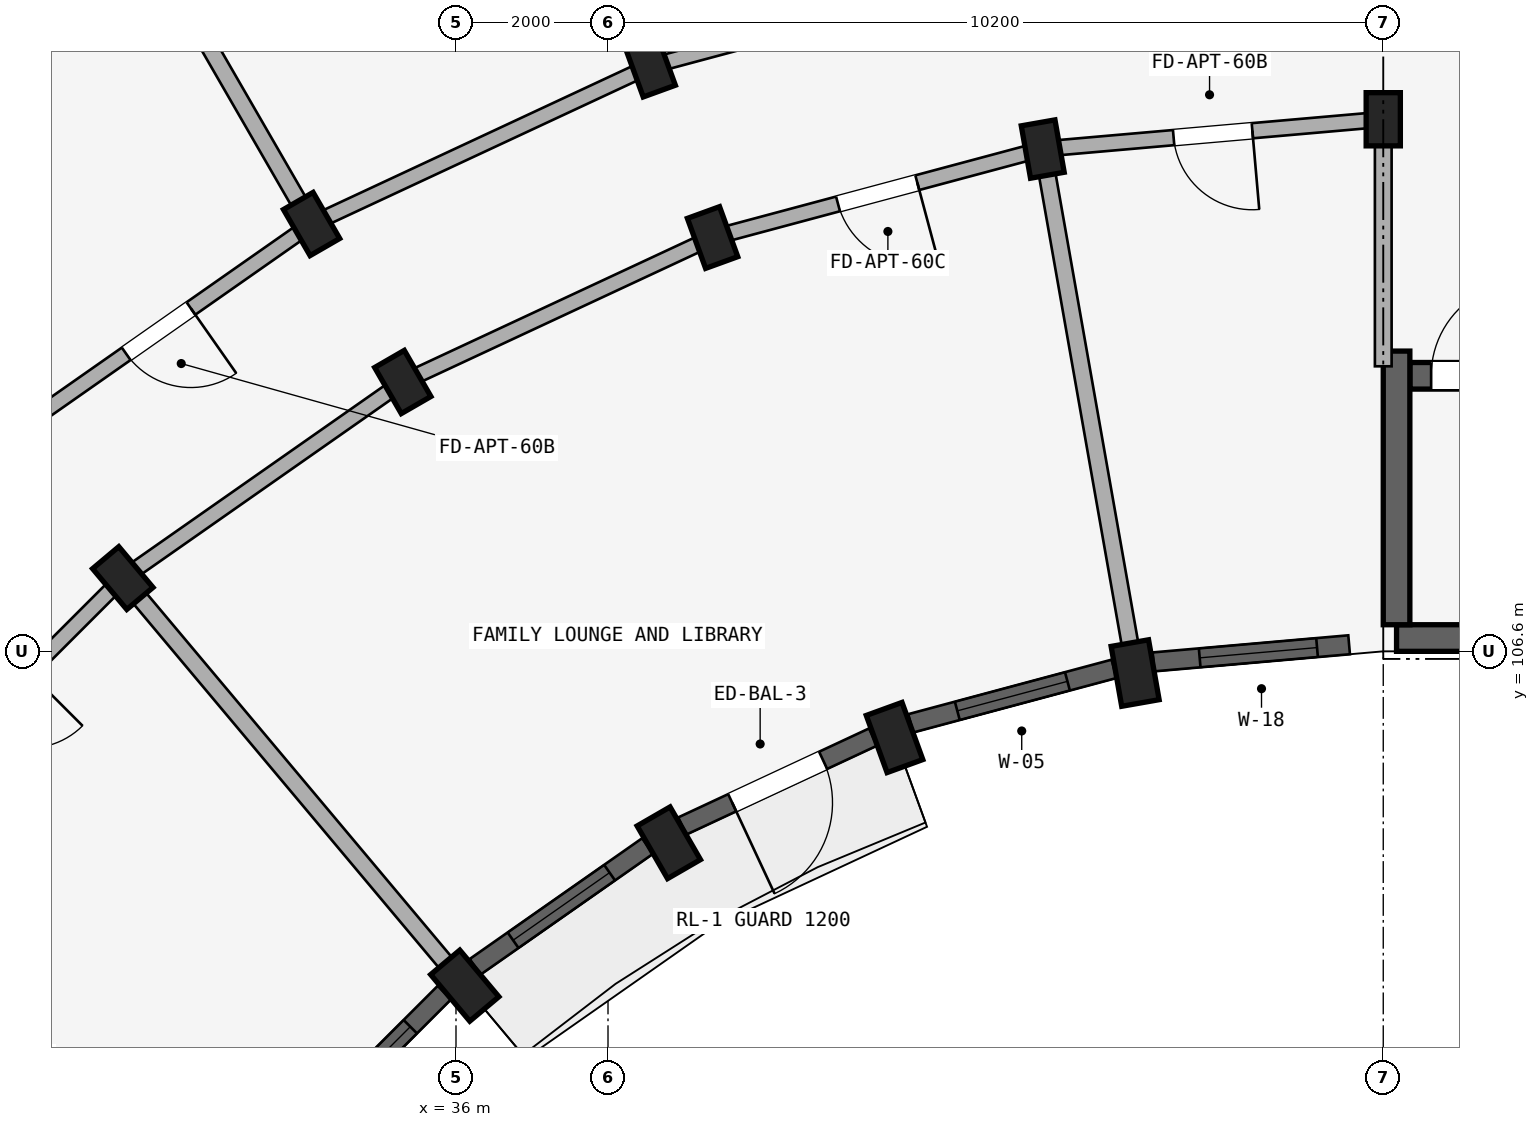
"""IFC4 building model, lengths in metres.
Left out: names, types, materials, properties, quantities, classifications, styles, units other than length and angle.
Written with IfcOpenShell. Run it as: python <this file> out.ifc"""

import sys

from ifc_helpers import new_model, si_unit, direction, frame, frame_2d, origin, origin_2d, place, context, subcontext, project, spatial, rectangle, extrude, element, fill, save


model = new_model("IFC4")
c1 = context("Model", 3, precision=1e-05, world=origin(), true_north=direction((0.0, 1.0)))
c2 = subcontext(c1, "Body", "Model", "MODEL_VIEW")
j1 = project(units=[si_unit("LENGTHUNIT", "METRE"), si_unit("PLANEANGLEUNIT", "RADIAN")], contexts=[c1])
p1 = place(None, origin())
s1 = spatial("IfcSite", under=j1, at=p1, CompositionType="ELEMENT")
p2 = place(p1, origin())
s2 = spatial("IfcBuilding", under=s1, at=p2, CompositionType="ELEMENT")
p3 = place(p2, frame((0.0, 0.0, 21.3)))
s3 = spatial("IfcBuildingStorey", under=s2, at=p3, CompositionType="ELEMENT", Elevation=21.3)
p4 = place(p3, frame((48.375, 106.775, 0.0), z_axis=(0.0, 0.0, 1.0), x_axis=(1.0, 0.0, 0.0)))
e1 = element("IfcWall", 1, at=p4, inside=s3, PredefinedType="SHEAR", context=c2, shape_type="SweptSolid", body=[
    extrude(rectangle(XDim=8.25, YDim=0.35, at=frame_2d((4.125, 0.0))), origin(), (0.0, 0.0, 1.0), 2.93),
])
p5 = place(p3, frame((48.55, 110.225, 0.0), z_axis=(0.0, 0.0, 1.0), x_axis=(1.0, 0.0, 0.0)))
e2 = element("IfcWall", 2, at=p5, inside=s3, PredefinedType="SHEAR", context=c2, shape_type="SweptSolid", body=[
    extrude(rectangle(XDim=7.9, YDim=0.35, at=frame_2d((3.95, 0.0))), origin(), (0.0, 0.0, 1.0), 2.93),
])
p6 = place(p5, frame((0.28, 0.0, 0.0)))
e3 = element("IfcOpeningElement", 3, at=p6, cuts=e2, PredefinedType="OPENING", context=c2, shape_type="SweptSolid", body=[
    extrude(rectangle(XDim=1.24, YDim=2.15, at=frame_2d((0.62, 1.075))), frame((0.0, 0.185, 0.0), z_axis=(0.0, -1.0, 0.0), x_axis=(1.0, 0.0, 0.0)), (0.0, 0.0, 1.0), 0.37),
])
p7 = place(p3, frame((48.375, 106.95, 0.0), z_axis=(0.0, 0.0, 1.0), x_axis=(0.0, 1.0, 0.0)))
e4 = element("IfcWall", 4, at=p7, inside=s3, PredefinedType="SHEAR", context=c2, shape_type="SweptSolid", body=[
    extrude(rectangle(XDim=3.6, YDim=0.35, at=frame_2d((1.8, 0.0))), origin(), (0.0, 0.0, 1.0), 2.93),
])
p8 = place(p3, frame((48.2, 113.6, 0.0), z_axis=(0.0, 0.0, 1.0), x_axis=(1.0, 0.0, 0.0)))
e5 = element("IfcColumn", 5, at=p8, inside=s3, PredefinedType="COLUMN", context=c2, shape_type="SweptSolid", body=[
    extrude(rectangle(XDim=0.45, YDim=0.7, at=origin_2d()), origin(), (0.0, 0.0, 1.0), 2.93),
])
p9 = place(p3, frame((44.935, 106.314, 0.0), z_axis=(0.0, 0.0, 1.0), x_axis=(0.984807753012, 0.173648177667, 0.0)))
e6 = element("IfcColumn", 6, at=p9, inside=s3, PredefinedType="COLUMN", context=c2, shape_type="SweptSolid", body=[
    extrude(rectangle(XDim=0.5, YDim=0.8, at=origin_2d()), origin(), (0.0, 0.0, 1.0), 2.93),
])
p10 = place(p3, frame((43.72, 113.208, 0.0), z_axis=(0.0, 0.0, 1.0), x_axis=(0.984807753012, 0.173648177667, 0.0)))
e7 = element("IfcColumn", 7, at=p10, inside=s3, PredefinedType="COLUMN", context=c2, shape_type="SweptSolid", body=[
    extrude(rectangle(XDim=0.45, YDim=0.7, at=origin_2d()), origin(), (0.0, 0.0, 1.0), 2.93),
])
p11 = place(p3, frame((41.77, 105.466, 0.0), z_axis=(0.0, 0.0, 1.0), x_axis=(0.939692620786, 0.342020143326, 0.0)))
e8 = element("IfcColumn", 8, at=p11, inside=s3, PredefinedType="COLUMN", context=c2, shape_type="SweptSolid", body=[
    extrude(rectangle(XDim=0.5, YDim=0.8, at=origin_2d()), origin(), (0.0, 0.0, 1.0), 2.93),
])
for number, where, z_axis, x_axis in (
    (9, (39.376, 112.044, 0.0), (0.0, 0.0, 1.0), (0.94, 0.342, 0.0)),
    (10, (38.555, 114.299, 0.0), (0.0, 0.0, 1.0), (0.94, 0.342, 0.0)),
):
    element("IfcColumn", number, at=place(p3, frame(where, z_axis=z_axis, x_axis=x_axis)), inside=s3, PredefinedType="COLUMN", context=c2, shape_type="SweptSolid", body=[
        extrude(rectangle(XDim=0.45, YDim=0.7, at=origin_2d()), origin(), (0.0, 0.0, 1.0), 2.93),
    ])
p12 = place(p3, frame((38.8, 104.081, 0.0), z_axis=(0.0, 0.0, 1.0), x_axis=(0.866025403784, 0.5, 0.0)))
e11 = element("IfcColumn", 11, at=p12, inside=s3, PredefinedType="COLUMN", context=c2, shape_type="SweptSolid", body=[
    extrude(rectangle(XDim=0.5, YDim=0.8, at=origin_2d()), origin(), (0.0, 0.0, 1.0), 2.93),
])
for number, where, z_axis, x_axis in (
    (12, (35.3, 110.144, 0.0), (0.0, 0.0, 1.0), (0.866, 0.5, 0.0)),
    (13, (34.1, 112.222, 0.0), (0.0, 0.0, 1.0), (0.866, 0.5, 0.0)),
):
    element("IfcColumn", number, at=place(p3, frame(where, z_axis=z_axis, x_axis=x_axis)), inside=s3, PredefinedType="COLUMN", context=c2, shape_type="SweptSolid", body=[
        extrude(rectangle(XDim=0.45, YDim=0.7, at=origin_2d()), origin(), (0.0, 0.0, 1.0), 2.93),
    ])
p13 = place(p3, frame((36.115, 102.202, 0.0), z_axis=(0.0, 0.0, 1.0), x_axis=(0.766044443119, 0.642787609687, 0.0)))
e14 = element("IfcColumn", 14, at=p13, inside=s3, PredefinedType="COLUMN", context=c2, shape_type="SweptSolid", body=[
    extrude(rectangle(XDim=0.5, YDim=0.8, at=origin_2d()), origin(), (0.0, 0.0, 1.0), 2.93),
])
p14 = place(p3, frame((31.616, 107.564, 0.0), z_axis=(0.0, 0.0, 1.0), x_axis=(0.766044443119, 0.642787609687, 0.0)))
e15 = element("IfcColumn", 15, at=p14, inside=s3, PredefinedType="COLUMN", context=c2, shape_type="SweptSolid", body=[
    extrude(rectangle(XDim=0.45, YDim=0.7, at=origin_2d()), origin(), (0.0, 0.0, 1.0), 2.93),
])
p15 = place(p3, frame((48.2, 113.6, 0.0), z_axis=(0.0, 0.0, 1.0), x_axis=(-0.996191949488, -0.087187153726, 0.0)))
e16 = element("IfcWall", 16, at=p15, inside=s3, PredefinedType="STANDARD", context=c2, shape_type="SweptSolid", body=[
    extrude(rectangle(XDim=4.497, YDim=0.2, at=frame_2d((2.249, 0.0))), origin(), (0.0, 0.0, 1.0), 2.372),
])
p16 = place(p15, frame((1.729, 0.0, 0.0)))
e17 = element("IfcOpeningElement", 17, at=p16, cuts=e16, PredefinedType="OPENING", context=c2, shape_type="SweptSolid", body=[
    extrude(rectangle(XDim=1.04, YDim=2.15, at=frame_2d((0.52, 1.075))), frame((0.0, 0.11, 0.0), z_axis=(0.0, -1.0, 0.0), x_axis=(1.0, 0.0, 0.0)), (0.0, 0.0, 1.0), 0.22),
])
p17 = place(p3, frame((43.72, 113.208, 0.0), z_axis=(0.0, 0.0, 1.0), x_axis=(-0.965934240054, -0.258787642463, 0.0)))
e18 = element("IfcWall", 18, at=p17, inside=s3, PredefinedType="STANDARD", context=c2, shape_type="SweptSolid", body=[
    extrude(rectangle(XDim=4.497, YDim=0.2, at=frame_2d((2.249, 0.0))), origin(), (0.0, 0.0, 1.0), 2.372),
])
p18 = place(p17, frame((1.709, 0.0, 0.0)))
e19 = element("IfcOpeningElement", 19, at=p18, cuts=e18, PredefinedType="OPENING", context=c2, shape_type="SweptSolid", body=[
    extrude(rectangle(XDim=1.08, YDim=2.15, at=frame_2d((0.54, 1.075))), frame((0.0, 0.11, 0.0), z_axis=(0.0, -1.0, 0.0), x_axis=(1.0, 0.0, 0.0)), (0.0, 0.0, 1.0), 0.22),
])
p19 = place(p3, frame((43.303, 115.572, 0.0), z_axis=(0.0, 0.0, 1.0), x_axis=(-0.965930095386, -0.258803112091, 0.0)))
e20 = element("IfcWall", 20, at=p19, inside=s3, PredefinedType="STANDARD", context=c2, shape_type="SweptSolid", body=[
    extrude(rectangle(XDim=4.916, YDim=0.2, at=frame_2d((2.458, 0.0))), origin(), (0.0, 0.0, 1.0), 2.372),
])
p20 = place(p3, frame((39.376, 112.044, 0.0), z_axis=(0.0, 0.0, 1.0), x_axis=(-0.906307919131, -0.422617978463, 0.0)))
e21 = element("IfcWall", 21, at=p20, inside=s3, PredefinedType="STANDARD", context=c2, shape_type="SweptSolid", body=[
    extrude(rectangle(XDim=4.497, YDim=0.2, at=frame_2d((2.249, 0.0))), origin(), (0.0, 0.0, 1.0), 2.372),
])
p21 = place(p3, frame((38.555, 114.299, 0.0), z_axis=(0.0, 0.0, 1.0), x_axis=(-0.906302381024, -0.422629854778, 0.0)))
e22 = element("IfcWall", 22, at=p21, inside=s3, PredefinedType="STANDARD", context=c2, shape_type="SweptSolid", body=[
    extrude(rectangle(XDim=4.915, YDim=0.2, at=frame_2d((2.458, 0.0))), origin(), (0.0, 0.0, 1.0), 2.372),
])
p22 = place(p3, frame((35.3, 110.144, 0.0), z_axis=(0.0, 0.0, 1.0), x_axis=(-0.819155404658, -0.573571637217, 0.0)))
e23 = element("IfcWall", 23, at=p22, inside=s3, PredefinedType="STANDARD", context=c2, shape_type="SweptSolid", body=[
    extrude(rectangle(XDim=4.497, YDim=0.2, at=frame_2d((2.249, 0.0))), origin(), (0.0, 0.0, 1.0), 2.372),
])
p23 = place(p3, frame((34.1, 112.222, 0.0), z_axis=(0.0, 0.0, 1.0), x_axis=(-0.819140911474, -0.573592335331, 0.0)))
e24 = element("IfcWall", 24, at=p23, inside=s3, PredefinedType="STANDARD", context=c2, shape_type="SweptSolid", body=[
    extrude(rectangle(XDim=4.916, YDim=0.2, at=frame_2d((2.458, 0.0))), origin(), (0.0, 0.0, 1.0), 2.372),
])
p24 = place(p23, frame((1.938, 0.0, 0.0)))
e25 = element("IfcOpeningElement", 25, at=p24, cuts=e24, PredefinedType="OPENING", context=c2, shape_type="SweptSolid", body=[
    extrude(rectangle(XDim=1.04, YDim=2.15, at=frame_2d((0.52, 1.075))), frame((0.0, 0.11, 0.0), z_axis=(0.0, -1.0, 0.0), x_axis=(1.0, 0.0, 0.0)), (0.0, 0.0, 1.0), 0.22),
])
p25 = place(p3, frame((31.616, 107.564, 0.0), z_axis=(0.0, 0.0, 1.0), x_axis=(-0.707106781187, -0.707106781187, 0.0)))
e26 = element("IfcWall", 26, at=p25, inside=s3, PredefinedType="STANDARD", context=c2, shape_type="SweptSolid", body=[
    extrude(rectangle(XDim=4.497, YDim=0.2, at=frame_2d((2.249, 0.0))), origin(), (0.0, 0.0, 1.0), 2.372),
])
p26 = place(p25, frame((1.749, 0.0, 0.0)))
e27 = element("IfcOpeningElement", 27, at=p26, cuts=e26, PredefinedType="OPENING", context=c2, shape_type="SweptSolid", body=[
    extrude(rectangle(XDim=1.0, YDim=2.15, at=frame_2d((0.5, 1.075))), frame((0.0, 0.11, 0.0), z_axis=(0.0, -1.0, 0.0), x_axis=(1.0, 0.0, 0.0)), (0.0, 0.0, 1.0), 0.22),
])
p27 = place(p3, frame((48.2, 110.35, 0.0), z_axis=(0.0, 0.0, 1.0), x_axis=(0.0, 1.0, 0.0)))
e28 = element("IfcWall", 28, at=p27, inside=s3, PredefinedType="STANDARD", context=c2, shape_type="SweptSolid", body=[
    extrude(rectangle(XDim=3.2, YDim=0.22, at=frame_2d((1.6, 0.0))), origin(), (0.0, 0.0, 1.0), 2.372),
])
p28 = place(p3, frame((44.901, 106.511, 0.0), z_axis=(0.0, 0.0, 1.0), x_axis=(-0.173647089161, 0.984807944945, 0.0)))
e29 = element("IfcWall", 29, at=p28, inside=s3, PredefinedType="STANDARD", context=c2, shape_type="SweptSolid", body=[
    extrude(rectangle(XDim=6.75, YDim=0.22, at=frame_2d((3.375, 0.0))), origin(), (0.0, 0.0, 1.0), 2.372),
])
p29 = place(p3, frame((38.521, 114.393, 0.0), z_axis=(0.0, 0.0, 1.0), x_axis=(-0.342022120477, 0.939691901159, 0.0)))
e30 = element("IfcWall", 30, at=p29, inside=s3, PredefinedType="PARTITIONING", context=c2, shape_type="SweptSolid", body=[
    extrude(rectangle(XDim=17.42, YDim=0.15, at=frame_2d((8.71, 0.0))), origin(), (0.0, 0.0, 1.0), 2.372),
])
p30 = place(p29, frame((4.45, 0.0, 0.0)))
e31 = element("IfcOpeningElement", 31, at=p30, cuts=e30, PredefinedType="OPENING", context=c2, shape_type="SweptSolid", body=[
    extrude(rectangle(XDim=0.8, YDim=2.1, at=frame_2d((0.4, 1.05))), frame((0.0, 0.085, 0.0), z_axis=(0.0, -1.0, 0.0), x_axis=(1.0, 0.0, 0.0)), (0.0, 0.0, 1.0), 0.17),
])
p31 = place(p3, frame((34.05, 112.309, 0.0), z_axis=(0.0, 0.0, 1.0), x_axis=(-0.499997843263, 0.866026648973, 0.0)))
e32 = element("IfcWall", 32, at=p31, inside=s3, PredefinedType="STANDARD", context=c2, shape_type="SweptSolid", body=[
    extrude(rectangle(XDim=17.42, YDim=0.22, at=frame_2d((8.71, 0.0))), origin(), (0.0, 0.0, 1.0), 2.372),
])
p32 = place(p3, frame((35.987, 102.355, 0.0), z_axis=(0.0, 0.0, 1.0), x_axis=(-0.642784846501, 0.766046761698, 0.0)))
e33 = element("IfcWall", 33, at=p32, inside=s3, PredefinedType="STANDARD", context=c2, shape_type="SweptSolid", body=[
    extrude(rectangle(XDim=6.75, YDim=0.22, at=frame_2d((3.375, 0.0))), origin(), (0.0, 0.0, 1.0), 2.372),
])
p33 = place(p3, frame((47.751, 106.686, 0.0), z_axis=(0.0, 0.0, 1.0), x_axis=(-0.996188278786, -0.087229084652, 0.0)))
e34 = element("IfcWall", 34, at=p33, inside=s3, PredefinedType="STANDARD", context=c2, shape_type="SweptSolid", body=[
    extrude(rectangle(XDim=2.583, YDim=0.25, at=frame_2d((1.292, 0.0))), origin(), (0.0, 0.0, 1.0), 2.472),
])
p34 = place(p33, frame((0.424, 0.0, 0.672)))
e35 = element("IfcOpeningElement", 35, at=p34, cuts=e34, PredefinedType="OPENING", context=c2, shape_type="SweptSolid", body=[
    extrude(rectangle(XDim=1.55, YDim=1.6, at=frame_2d((0.775, 0.8))), frame((0.0, 0.135, 0.0), z_axis=(0.0, -1.0, 0.0), x_axis=(1.0, 0.0, 0.0)), (0.0, 0.0, 1.0), 0.27),
])
p35 = place(p3, frame((44.658, 106.369, 0.0), z_axis=(0.0, 0.0, 1.0), x_axis=(-0.965935855992, -0.25878161084, 0.0)))
e36 = element("IfcWall", 36, at=p35, inside=s3, PredefinedType="STANDARD", context=c2, shape_type="SweptSolid", body=[
    extrude(rectangle(XDim=2.77, YDim=0.25, at=frame_2d((1.385, 0.0))), origin(), (0.0, 0.0, 1.0), 2.472),
])
p36 = place(p35, frame((0.635, 0.0, 0.622)))
e37 = element("IfcOpeningElement", 37, at=p36, cuts=e36, PredefinedType="OPENING", context=c2, shape_type="SweptSolid", body=[
    extrude(rectangle(XDim=1.5, YDim=1.65, at=frame_2d((0.75, 0.825))), frame((0.0, 0.135, 0.0), z_axis=(0.0, -1.0, 0.0), x_axis=(1.0, 0.0, 0.0)), (0.0, 0.0, 1.0), 0.27),
])
p37 = place(p3, frame((41.487, 105.472, 0.0), z_axis=(0.0, 0.0, 1.0), x_axis=(-0.906293449611, -0.422649007088, 0.0)))
e38 = element("IfcWall", 38, at=p37, inside=s3, PredefinedType="STANDARD", context=c2, shape_type="SweptSolid", body=[
    extrude(rectangle(XDim=2.77, YDim=0.25, at=frame_2d((1.385, 0.0))), origin(), (0.0, 0.0, 1.0), 2.472),
])
p38 = place(p37, frame((0.725, 0.0, 0.0)))
e39 = element("IfcOpeningElement", 39, at=p38, cuts=e38, PredefinedType="OPENING", context=c2, shape_type="SweptSolid", body=[
    extrude(rectangle(XDim=1.32, YDim=2.15, at=frame_2d((0.66, 1.075))), frame((0.0, 0.135, 0.0), z_axis=(0.0, -1.0, 0.0), x_axis=(1.0, 0.0, 0.0)), (0.0, 0.0, 1.0), 0.27),
])
p39 = place(p3, frame((38.521, 104.038, 0.0), z_axis=(0.0, 0.0, 1.0), x_axis=(-0.819111815273, -0.573633885053, 0.0)))
e40 = element("IfcWall", 40, at=p39, inside=s3, PredefinedType="STANDARD", context=c2, shape_type="SweptSolid", body=[
    extrude(rectangle(XDim=2.77, YDim=0.25, at=frame_2d((1.385, 0.0))), origin(), (0.0, 0.0, 1.0), 2.472),
])
p40 = place(p39, frame((0.61, 0.0, 0.672)))
e41 = element("IfcOpeningElement", 41, at=p40, cuts=e40, PredefinedType="OPENING", context=c2, shape_type="SweptSolid", body=[
    extrude(rectangle(XDim=1.55, YDim=1.6, at=frame_2d((0.775, 0.8))), frame((0.0, 0.135, 0.0), z_axis=(0.0, -1.0, 0.0), x_axis=(1.0, 0.0, 0.0)), (0.0, 0.0, 1.0), 0.27),
])
p41 = place(p3, frame((35.848, 102.111, 0.0), z_axis=(0.0, 0.0, 1.0), x_axis=(-0.707106781187, -0.707106781187, 0.0)))
e42 = element("IfcWall", 42, at=p41, inside=s3, PredefinedType="STANDARD", context=c2, shape_type="SweptSolid", body=[
    extrude(rectangle(XDim=2.77, YDim=0.25, at=frame_2d((1.385, 0.0))), origin(), (0.0, 0.0, 1.0), 2.472),
])
p42 = place(p41, frame((0.635, 0.0, 0.622)))
e43 = element("IfcOpeningElement", 43, at=p42, cuts=e42, PredefinedType="OPENING", context=c2, shape_type="SweptSolid", body=[
    extrude(rectangle(XDim=1.5, YDim=1.65, at=frame_2d((0.75, 0.825))), frame((0.0, 0.135, 0.0), z_axis=(0.0, -1.0, 0.0), x_axis=(1.0, 0.0, 0.0)), (0.0, 0.0, 1.0), 0.27),
])
p43 = place(p34, origin())
e44 = element("IfcWindow", 44, at=p43, inside=s3, PartitioningType="DOUBLE_PANEL_VERTICAL", PredefinedType="WINDOW", context=c2, shape_type="SweptSolid", body=[
    extrude(rectangle(XDim=1.55, YDim=1.6, at=frame_2d((0.775, 0.8))), frame((0.0, 0.03, 0.0), z_axis=(0.0, -1.0, 0.0), x_axis=(1.0, 0.0, 0.0)), (0.0, 0.0, 1.0), 0.06),
])
fill(e35, e44)
p44 = place(p36, origin())
e45 = element("IfcWindow", 45, at=p44, inside=s3, PartitioningType="DOUBLE_PANEL_VERTICAL", PredefinedType="WINDOW", context=c2, shape_type="SweptSolid", body=[
    extrude(rectangle(XDim=1.5, YDim=1.65, at=frame_2d((0.75, 0.825))), frame((0.0, 0.03, 0.0), z_axis=(0.0, -1.0, 0.0), x_axis=(1.0, 0.0, 0.0)), (0.0, 0.0, 1.0), 0.06),
])
fill(e37, e45)
p45 = place(p40, origin())
e46 = element("IfcWindow", 46, at=p45, inside=s3, PartitioningType="DOUBLE_PANEL_VERTICAL", PredefinedType="WINDOW", context=c2, shape_type="SweptSolid", body=[
    extrude(rectangle(XDim=1.55, YDim=1.6, at=frame_2d((0.775, 0.8))), frame((0.0, 0.03, 0.0), z_axis=(0.0, -1.0, 0.0), x_axis=(1.0, 0.0, 0.0)), (0.0, 0.0, 1.0), 0.06),
])
fill(e41, e46)
p46 = place(p42, origin())
e47 = element("IfcWindow", 47, at=p46, inside=s3, PartitioningType="DOUBLE_PANEL_VERTICAL", PredefinedType="WINDOW", context=c2, shape_type="SweptSolid", body=[
    extrude(rectangle(XDim=1.5, YDim=1.65, at=frame_2d((0.75, 0.825))), frame((0.0, 0.03, 0.0), z_axis=(0.0, -1.0, 0.0), x_axis=(1.0, 0.0, 0.0)), (0.0, 0.0, 1.0), 0.06),
])
fill(e43, e47)
p47 = place(p6, frame((1.24, 0.0, 0.0), z_axis=(0.0, 0.0, 1.0), x_axis=(-1.0, 0.0, 0.0)))
e48 = element("IfcDoor", 48, at=p47, inside=s3, OperationType="SINGLE_SWING_LEFT", PredefinedType="DOOR", context=c2, shape_type="SweptSolid", body=[
    extrude(rectangle(XDim=1.24, YDim=2.15, at=frame_2d((0.62, 1.075))), frame((0.0, 0.025, 0.0), z_axis=(0.0, -1.0, 0.0), x_axis=(1.0, 0.0, 0.0)), (0.0, 0.0, 1.0), 0.05),
])
fill(e3, e48)
p48 = place(p24, frame((1.04, 0.0, 0.0), z_axis=(0.0, 0.0, 1.0), x_axis=(-1.0, 0.0, 0.0)))
e49 = element("IfcDoor", 49, at=p48, inside=s3, OperationType="SINGLE_SWING_RIGHT", PredefinedType="DOOR", context=c2, shape_type="SweptSolid", body=[
    extrude(rectangle(XDim=1.04, YDim=2.15, at=frame_2d((0.52, 1.075))), frame((0.0, 0.025, 0.0), z_axis=(0.0, -1.0, 0.0), x_axis=(1.0, 0.0, 0.0)), (0.0, 0.0, 1.0), 0.05),
])
fill(e25, e49)
p49 = place(p16, origin())
e50 = element("IfcDoor", 50, at=p49, inside=s3, OperationType="SINGLE_SWING_LEFT", PredefinedType="DOOR", context=c2, shape_type="SweptSolid", body=[
    extrude(rectangle(XDim=1.04, YDim=2.15, at=frame_2d((0.52, 1.075))), frame((0.0, 0.025, 0.0), z_axis=(0.0, -1.0, 0.0), x_axis=(1.0, 0.0, 0.0)), (0.0, 0.0, 1.0), 0.05),
])
fill(e17, e50)
p50 = place(p18, frame((1.08, 0.0, 0.0), z_axis=(0.0, 0.0, 1.0), x_axis=(-1.0, 0.0, 0.0)))
e51 = element("IfcDoor", 51, at=p50, inside=s3, OperationType="SINGLE_SWING_RIGHT", PredefinedType="DOOR", context=c2, shape_type="SweptSolid", body=[
    extrude(rectangle(XDim=1.08, YDim=2.15, at=frame_2d((0.54, 1.075))), frame((0.0, 0.025, 0.0), z_axis=(0.0, -1.0, 0.0), x_axis=(1.0, 0.0, 0.0)), (0.0, 0.0, 1.0), 0.05),
])
fill(e19, e51)
p51 = place(p38, origin())
e52 = element("IfcDoor", 52, at=p51, inside=s3, OperationType="SINGLE_SWING_RIGHT", PredefinedType="DOOR", context=c2, shape_type="SweptSolid", body=[
    extrude(rectangle(XDim=1.32, YDim=2.15, at=frame_2d((0.66, 1.075))), frame((0.0, 0.025, 0.0), z_axis=(0.0, -1.0, 0.0), x_axis=(1.0, 0.0, 0.0)), (0.0, 0.0, 1.0), 0.05),
])
fill(e39, e52)
save(model, sys.argv[1])
